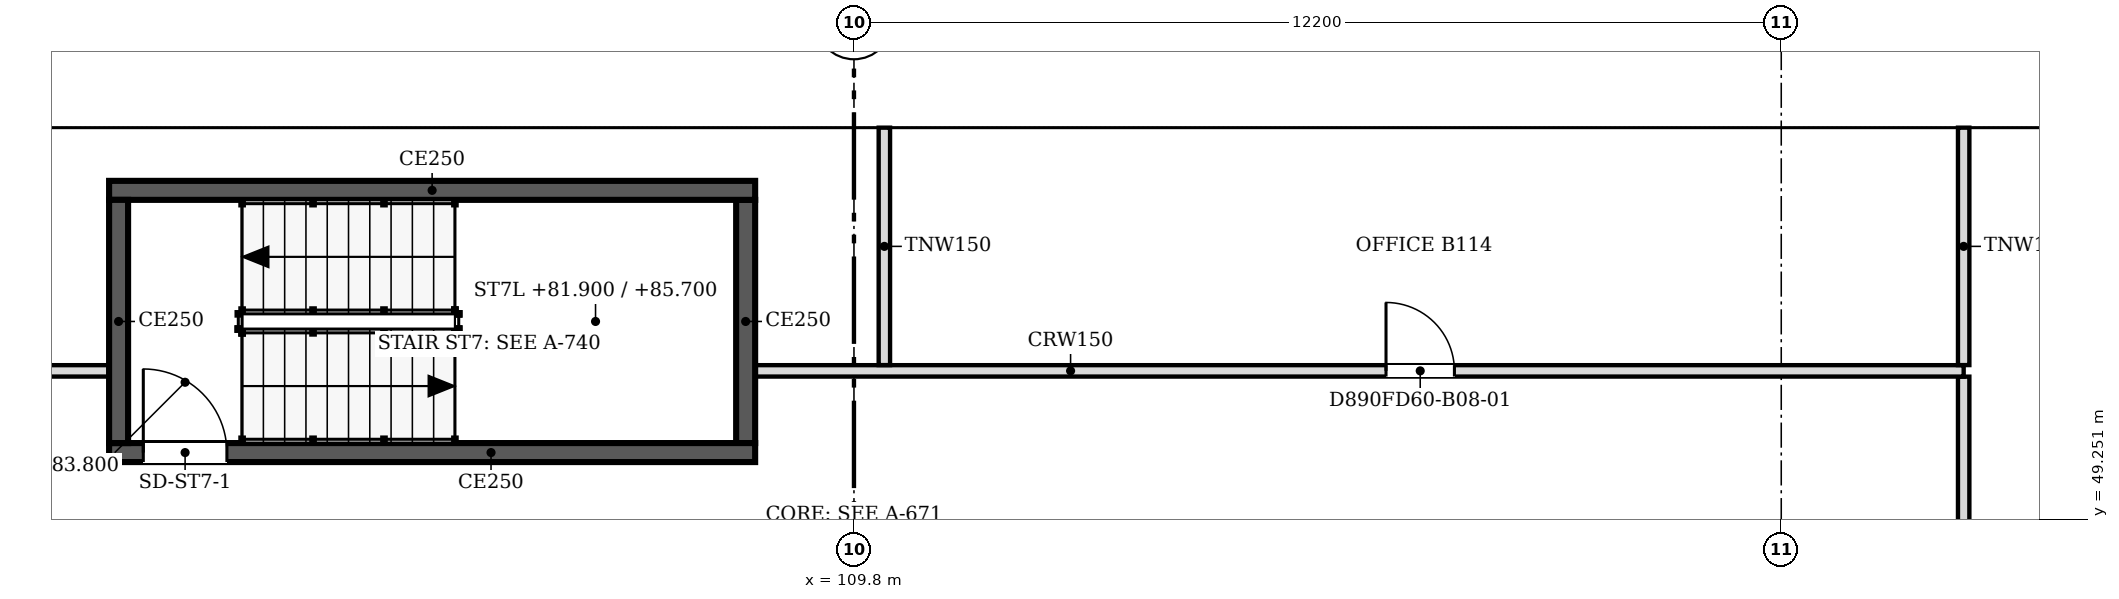
"""IFC4 building model, lengths in metres.
Left out: names, types, materials, properties, quantities, classifications, styles, units other than length and angle.
Written with IfcOpenShell. Run it as: python <this file> out.ifc"""

import sys

from ifc_helpers import new_model, si_unit, direction, frame, frame_2d, origin, place, context, subcontext, project, spatial, polyline, rectangle, outline, extrude, faceted_brep, source, transform, mapped, element, fill, save


model = new_model("IFC4")
c1 = context("Model", 3, precision=1e-05, world=origin(), true_north=direction((0.0, 1.0)))
c2 = subcontext(c1, "Body", "Model", "MODEL_VIEW")
j1 = project(units=[si_unit("LENGTHUNIT", "METRE"), si_unit("PLANEANGLEUNIT", "RADIAN")], contexts=[c1])
p1 = place(None, origin())
s1 = spatial("IfcSite", under=j1, at=p1, CompositionType="ELEMENT")
p2 = place(p1, origin())
s2 = spatial("IfcBuilding", under=s1, at=p2, CompositionType="ELEMENT")
p3 = place(p2, frame((0.0, 0.0, 80.0)))
s3 = spatial("IfcBuildingStorey", under=s2, at=p3, CompositionType="ELEMENT", Elevation=80.0)
m1 = source(origin(), c2, "Body", "Brep", [
    faceted_brep([(3.003, -0.25, 0.0), (6.053, -0.25, 3.8), (3.003, -0.25, 7.6), (0.0, -0.25, 3.8), (0.047, 0.25, 3.859), (3.003, 0.25, 7.6), (6.053, 0.25, 3.8), (3.003, 0.25, 0.0), (0.047, 0.25, 3.741), (0.0, 0.0, 3.8)], [[[0, 1, 2, 3]], [[4, 5, 6, 7, 8]], [[7, 6, 1, 0]], [[6, 5, 2, 1]], [[5, 4, 9, 3, 2]], [[8, 7, 0, 3, 9]], [[8, 9, 4]]]),
])
p4 = place(p3, frame((128.053, 54.65, -3.8), z_axis=(0.0, 0.0, 1.0), x_axis=(-1.0, 0.0, 0.0)))
e1 = element("IfcWall", 1, at=p4, inside=s3, PredefinedType="SOLIDWALL", context=c2, shape_type="MappedRepresentation", body=[
    mapped(m1, transform((0.0, 0.0, 0.0), scale=1.0)),
])
m2 = source(origin(), c2, "Body", "SweptSolid", [
    extrude(outline(polyline([(3.005, 0.401), (5.733, 3.8), (3.005, 7.199), (0.319, 3.8), (3.005, 0.401)])), frame((0.0, 0.26, 0.0), z_axis=(0.0, -1.0, 0.0), x_axis=(1.0, 0.0, 0.0)), (0.0, 0.0, 1.0), 0.52),
])
p5 = place(p4, origin())
e2 = element("IfcOpeningElement", 2, at=p5, cuts=e1, PredefinedType="OPENING", context=c2, shape_type="MappedRepresentation", body=[
    mapped(m2, transform((0.0, 0.0, 0.0), scale=1.0)),
])
m3 = source(origin(), c2, "Body", "SweptSolid", [
    extrude(outline(polyline([(3.05, 0.0), (6.1, 3.8), (3.05, 7.6), (0.0, 3.8), (3.05, 0.0)])), frame((0.0, 0.25, 0.0), z_axis=(0.0, -1.0, 0.0), x_axis=(1.0, 0.0, 0.0)), (0.0, 0.0, 1.0), 0.5),
])
p6 = place(p3, frame((122.0, 54.65, -3.8), z_axis=(0.0, 0.0, 1.0), x_axis=(-1.0, 0.0, 0.0)))
e3 = element("IfcWall", 3, at=p6, inside=s3, PredefinedType="SOLIDWALL", context=c2, shape_type="MappedRepresentation", body=[
    mapped(m3, transform((0.0, 0.0, 0.0), scale=1.0)),
])
m4 = source(origin(), c2, "Body", "SweptSolid", [
    extrude(outline(polyline([(3.05, 0.399), (5.78, 3.8), (3.05, 7.201), (0.321, 3.8), (3.05, 0.399)])), frame((0.0, 0.26, 0.0), z_axis=(0.0, -1.0, 0.0), x_axis=(1.0, 0.0, 0.0)), (0.0, 0.0, 1.0), 0.52),
])
p7 = place(p6, origin())
e4 = element("IfcOpeningElement", 4, at=p7, cuts=e3, PredefinedType="OPENING", context=c2, shape_type="MappedRepresentation", body=[
    mapped(m4, transform((0.0, 0.0, 0.0), scale=1.0)),
])
m5 = source(origin(), c2, "Body", "Brep", [
    faceted_brep([(3.05, -0.25, 0.0), (6.1, -0.25, 3.8), (6.1, -0.25, 3.8), (3.05, -0.25, 7.6), (0.0, -0.25, 3.8), (0.0, 0.25, 3.8), (3.05, 0.25, 7.6), (6.1, 0.25, 3.8), (6.1, 0.25, 3.8), (3.05, 0.25, 0.0)], [[[0, 1, 2, 3, 4]], [[5, 6, 7, 8, 9]], [[9, 8, 1, 0]], [[7, 6, 3, 2]], [[6, 5, 4, 3]], [[5, 9, 0, 4]], [[1, 8, 7, 2]]]),
])
p8 = place(p3, frame((115.9, 54.65, -3.8), z_axis=(0.0, 0.0, 1.0), x_axis=(-1.0, 0.0, 0.0)))
e5 = element("IfcWall", 5, at=p8, inside=s3, PredefinedType="SOLIDWALL", context=c2, shape_type="MappedRepresentation", body=[
    mapped(m5, transform((0.0, 0.0, 0.0), scale=1.0)),
])
p9 = place(p8, origin())
e6 = element("IfcOpeningElement", 6, at=p9, cuts=e5, PredefinedType="OPENING", context=c2, shape_type="MappedRepresentation", body=[
    mapped(m4, transform((0.0, 0.0, 0.0), scale=1.0)),
])
p10 = place(p3, frame((109.8, 54.65, -3.8), z_axis=(0.0, 0.0, 1.0), x_axis=(-1.0, 0.0, 0.0)))
e7 = element("IfcWall", 7, at=p10, inside=s3, PredefinedType="SOLIDWALL", context=c2, shape_type="MappedRepresentation", body=[
    mapped(m3, transform((0.0, 0.0, 0.0), scale=1.0)),
])
p11 = place(p10, origin())
e8 = element("IfcOpeningElement", 8, at=p11, cuts=e7, PredefinedType="OPENING", context=c2, shape_type="MappedRepresentation", body=[
    mapped(m4, transform((0.0, 0.0, 0.0), scale=1.0)),
])
p12 = place(p3, frame((103.7, 54.65, -3.8), z_axis=(0.0, 0.0, 1.0), x_axis=(-1.0, 0.0, 0.0)))
e9 = element("IfcWall", 9, at=p12, inside=s3, PredefinedType="SOLIDWALL", context=c2, shape_type="MappedRepresentation", body=[
    mapped(m5, transform((0.0, 0.0, 0.0), scale=1.0)),
])
p13 = place(p12, origin())
e10 = element("IfcOpeningElement", 10, at=p13, cuts=e9, PredefinedType="OPENING", context=c2, shape_type="MappedRepresentation", body=[
    mapped(m4, transform((0.0, 0.0, 0.0), scale=1.0)),
])
p14 = place(p2, frame((0.0, 0.0, 83.8)))
s4 = spatial("IfcBuildingStorey", under=s2, at=p14, CompositionType="ELEMENT", Elevation=83.8)
m6 = source(origin(), c2, "Body", "Brep", [
    faceted_brep([(0.047, -0.25, 0.0), (3.05, -0.25, 3.8), (0.047, -0.25, 7.6), (0.0, -0.25, 7.54), (0.0, -0.25, 0.06), (0.093, 0.25, 7.541), (3.05, 0.25, 3.8), (0.093, 0.25, 0.059), (0.047, 0.0, 0.0), (0.047, 0.0, 7.6)], [[[0, 1, 2, 3, 4]], [[5, 6, 7]], [[7, 6, 1, 0, 8]], [[6, 5, 9, 2, 1]], [[3, 2, 9]], [[8, 0, 4]], [[7, 8, 4, 3, 9, 5]]]),
])
p15 = place(p14, frame((128.1, 54.65, -3.8), z_axis=(0.0, 0.0, 1.0), x_axis=(-1.0, 0.0, 0.0)))
e11 = element("IfcWall", 11, at=p15, inside=s4, PredefinedType="SOLIDWALL", context=c2, shape_type="MappedRepresentation", body=[
    mapped(m6, transform((0.0, 0.0, 0.0), scale=1.0)),
])
m7 = source(origin(), c2, "Body", "SweptSolid", [
    extrude(outline(polyline([(0.247, 0.656), (2.731, 3.8), (0.247, 6.944), (0.247, 0.656)])), frame((0.0, 0.26, 0.0), z_axis=(0.0, -1.0, 0.0), x_axis=(1.0, 0.0, 0.0)), (0.0, 0.0, 1.0), 0.52),
])
p16 = place(p15, origin())
e12 = element("IfcOpeningElement", 12, at=p16, cuts=e11, PredefinedType="OPENING", context=c2, shape_type="MappedRepresentation", body=[
    mapped(m7, transform((0.0, 0.0, 0.0), scale=1.0)),
])
p17 = place(p14, frame((125.05, 54.65, -3.8), z_axis=(0.0, 0.0, 1.0), x_axis=(-1.0, 0.0, 0.0)))
e13 = element("IfcWall", 13, at=p17, inside=s4, PredefinedType="SOLIDWALL", context=c2, shape_type="MappedRepresentation", body=[
    mapped(m3, transform((0.0, 0.0, 0.0), scale=1.0)),
])
p18 = place(p17, origin())
e14 = element("IfcOpeningElement", 14, at=p18, cuts=e13, PredefinedType="OPENING", context=c2, shape_type="MappedRepresentation", body=[
    mapped(m4, transform((0.0, 0.0, 0.0), scale=1.0)),
])
p19 = place(p14, frame((118.95, 54.65, -3.8), z_axis=(0.0, 0.0, 1.0), x_axis=(-1.0, 0.0, 0.0)))
e15 = element("IfcWall", 15, at=p19, inside=s4, PredefinedType="SOLIDWALL", context=c2, shape_type="MappedRepresentation", body=[
    mapped(m5, transform((0.0, 0.0, 0.0), scale=1.0)),
])
p20 = place(p19, origin())
e16 = element("IfcOpeningElement", 16, at=p20, cuts=e15, PredefinedType="OPENING", context=c2, shape_type="MappedRepresentation", body=[
    mapped(m4, transform((0.0, 0.0, 0.0), scale=1.0)),
])
p21 = place(p14, frame((112.85, 54.65, -3.8), z_axis=(0.0, 0.0, 1.0), x_axis=(-1.0, 0.0, 0.0)))
e17 = element("IfcWall", 17, at=p21, inside=s4, PredefinedType="SOLIDWALL", context=c2, shape_type="MappedRepresentation", body=[
    mapped(m3, transform((0.0, 0.0, 0.0), scale=1.0)),
])
p22 = place(p21, origin())
e18 = element("IfcOpeningElement", 18, at=p22, cuts=e17, PredefinedType="OPENING", context=c2, shape_type="MappedRepresentation", body=[
    mapped(m4, transform((0.0, 0.0, 0.0), scale=1.0)),
])
p23 = place(p14, frame((106.75, 54.65, -3.8), z_axis=(0.0, 0.0, 1.0), x_axis=(-1.0, 0.0, 0.0)))
e19 = element("IfcWall", 19, at=p23, inside=s4, PredefinedType="SOLIDWALL", context=c2, shape_type="MappedRepresentation", body=[
    mapped(m3, transform((0.0, 0.0, 0.0), scale=1.0)),
])
p24 = place(p23, origin())
e20 = element("IfcOpeningElement", 20, at=p24, cuts=e19, PredefinedType="OPENING", context=c2, shape_type="MappedRepresentation", body=[
    mapped(m4, transform((0.0, 0.0, 0.0), scale=1.0)),
])
p25 = place(p14, frame((100.65, 54.65, -3.8), z_axis=(0.0, 0.0, 1.0), x_axis=(-1.0, 0.0, 0.0)))
e21 = element("IfcWall", 21, at=p25, inside=s4, PredefinedType="SOLIDWALL", context=c2, shape_type="MappedRepresentation", body=[
    mapped(m5, transform((0.0, 0.0, 0.0), scale=1.0)),
])
p26 = place(p25, origin())
e22 = element("IfcOpeningElement", 22, at=p26, cuts=e21, PredefinedType="OPENING", context=c2, shape_type="MappedRepresentation", body=[
    mapped(m4, transform((0.0, 0.0, 0.0), scale=1.0)),
])
p27 = place(p3, frame((108.5, 50.125, 0.0), z_axis=(0.0, 0.0, 1.0), x_axis=(-1.0, 0.0, 0.0)))
e23 = element("IfcWall", 23, at=p27, inside=s3, PredefinedType="SOLIDWALL", context=c2, shape_type="SweptSolid", body=[
    extrude(rectangle(XDim=8.5, YDim=0.25, at=frame_2d((4.25, 0.0))), origin(), (0.0, 0.0, 1.0), 3.8),
])
m8 = source(origin(), c2, "Body", "SweptSolid", [
    extrude(rectangle(XDim=1.1, YDim=2.1, at=frame_2d((0.55, 1.05))), frame((0.0, 0.135, 0.0), z_axis=(0.0, -1.0, 0.0), x_axis=(1.0, 0.0, 0.0)), (0.0, 0.0, 1.0), 0.27),
])
p28 = place(p27, frame((6.95, 0.0, 0.0)))
e24 = element("IfcOpeningElement", 24, at=p28, cuts=e23, PredefinedType="OPENING", context=c2, shape_type="MappedRepresentation", body=[
    mapped(m8, transform((0.0, 0.0, 0.0), scale=1.0)),
])
p29 = place(p3, frame((100.125, 50.25, 0.0), z_axis=(0.0, 0.0, 1.0), x_axis=(0.0, 1.0, 0.0)))
e25 = element("IfcWall", 25, at=p29, inside=s3, PredefinedType="SOLIDWALL", context=c2, shape_type="SweptSolid", body=[
    extrude(rectangle(XDim=3.2, YDim=0.25, at=frame_2d((1.6, 0.0))), origin(), (0.0, 0.0, 1.0), 3.8),
])
p30 = place(p3, frame((100.0, 53.575, 0.0), z_axis=(0.0, 0.0, 1.0), x_axis=(1.0, 0.0, 0.0)))
e26 = element("IfcWall", 26, at=p30, inside=s3, PredefinedType="SOLIDWALL", context=c2, shape_type="SweptSolid", body=[
    extrude(rectangle(XDim=8.5, YDim=0.25, at=frame_2d((4.25, 0.0))), origin(), (0.0, 0.0, 1.0), 3.8),
])
p31 = place(p3, frame((108.375, 53.45, 0.0), z_axis=(0.0, 0.0, 1.0), x_axis=(0.0, -1.0, 0.0)))
e27 = element("IfcWall", 27, at=p31, inside=s3, PredefinedType="SOLIDWALL", context=c2, shape_type="SweptSolid", body=[
    extrude(rectangle(XDim=3.2, YDim=0.25, at=frame_2d((1.6, 0.0))), origin(), (0.0, 0.0, 1.0), 3.8),
])
p32 = place(p3, frame((124.4, 51.124, 0.0), z_axis=(0.0, 0.0, 1.0), x_axis=(0.0, -1.0, 0.0)))
e28 = element("IfcWall", 28, at=p32, inside=s3, PredefinedType="PARTITIONING", context=c2, shape_type="SweptSolid", body=[
    extrude(rectangle(XDim=14.448, YDim=0.15, at=frame_2d((7.224, 0.0))), origin(), (0.0, 0.0, 1.0), 3.067),
])
m9 = source(origin(), c2, "Body", "SweptSolid", [
    extrude(rectangle(XDim=1.0, YDim=2.1, at=frame_2d((0.5, 1.05))), frame((0.0, 0.085, 0.0), z_axis=(0.0, -1.0, 0.0), x_axis=(1.0, 0.0, 0.0)), (0.0, 0.0, 1.0), 0.17),
])
p33 = place(p32, frame((3.724, 0.0, 0.0)))
e29 = element("IfcOpeningElement", 29, at=p33, cuts=e28, PredefinedType="OPENING", context=c2, shape_type="MappedRepresentation", body=[
    mapped(m9, transform((0.0, 0.0, 0.0), scale=1.0)),
])
p34 = place(p3, frame((95.276, 51.2, 0.0), z_axis=(0.0, 0.0, 1.0), x_axis=(1.0, 0.0, 0.0)))
e30 = element("IfcWall", 30, at=p34, inside=s3, PredefinedType="PARTITIONING", context=c2, shape_type="SweptSolid", body=[
    extrude(rectangle(XDim=4.724, YDim=0.15, at=frame_2d((2.362, 0.0))), origin(), (0.0, 0.0, 1.0), 3.067),
])
p35 = place(p34, frame((1.9, 0.0, 0.0)))
e31 = element("IfcOpeningElement", 31, at=p35, cuts=e30, PredefinedType="OPENING", context=c2, shape_type="MappedRepresentation", body=[
    mapped(m9, transform((0.0, 0.0, 0.0), scale=1.0)),
])
p36 = place(p3, frame((108.5, 51.2, 0.0), z_axis=(0.0, 0.0, 1.0), x_axis=(1.0, 0.0, 0.0)))
e32 = element("IfcWall", 32, at=p36, inside=s3, PredefinedType="PARTITIONING", context=c2, shape_type="SweptSolid", body=[
    extrude(rectangle(XDim=15.9, YDim=0.15, at=frame_2d((7.95, 0.0))), origin(), (0.0, 0.0, 1.0), 3.067),
])
m10 = source(origin(), c2, "Body", "SweptSolid", [
    extrude(rectangle(XDim=0.9, YDim=2.1, at=frame_2d((0.45, 1.05))), frame((0.0, 0.085, 0.0), z_axis=(0.0, -1.0, 0.0), x_axis=(1.0, 0.0, 0.0)), (0.0, 0.0, 1.0), 0.17),
])
p37 = place(p36, frame((8.3, 0.0, 0.0)))
e33 = element("IfcOpeningElement", 33, at=p37, cuts=e32, PredefinedType="OPENING", context=c2, shape_type="MappedRepresentation", body=[
    mapped(m10, transform((0.0, 0.0, 0.0), scale=1.0)),
])
for number, where, z_axis, x_axis in (
    (34, (110.2, 51.276, 0.0), (0.0, 0.0, 1.0), (0.0, 1.0, 0.0)),
    (35, (124.4, 51.276, 0.0), (0.0, 0.0, 1.0), (0.0, 1.0, 0.0)),
):
    element("IfcWall", number, at=place(p3, frame(where, z_axis=z_axis, x_axis=x_axis)), inside=s3, PredefinedType="PARTITIONING", context=c2, shape_type="SweptSolid", body=[
        extrude(rectangle(XDim=3.124, YDim=0.15, at=frame_2d((1.562, 0.0))), origin(), (0.0, 0.0, 1.0), 3.067),
    ])
m11 = source(origin(), c2, "Body", "SweptSolid", [
    extrude(rectangle(XDim=1.1, YDim=2.1, at=frame_2d((0.55, 1.05))), frame((0.0, 0.025, 0.0), z_axis=(0.0, -1.0, 0.0), x_axis=(1.0, 0.0, 0.0)), (0.0, 0.0, 1.0), 0.05),
])
p38 = place(p28, origin())
e36 = element("IfcDoor", 36, at=p38, inside=s3, OperationType="SINGLE_SWING_RIGHT", PredefinedType="DOOR", context=c2, shape_type="MappedRepresentation", body=[
    mapped(m11, transform((0.0, 0.0, 0.0), scale=1.0)),
])
fill(e24, e36)
m12 = source(origin(), c2, "Body", "SweptSolid", [
    extrude(rectangle(XDim=0.9, YDim=2.1, at=frame_2d((0.45, 1.05))), frame((0.0, 0.025, 0.0), z_axis=(0.0, -1.0, 0.0), x_axis=(1.0, 0.0, 0.0)), (0.0, 0.0, 1.0), 0.05),
])
p39 = place(p37, origin())
e37 = element("IfcDoor", 37, at=p39, inside=s3, OperationType="SINGLE_SWING_LEFT", PredefinedType="DOOR", context=c2, shape_type="MappedRepresentation", body=[
    mapped(m12, transform((0.0, 0.0, 0.0), scale=1.0)),
])
fill(e33, e37)
save(model, sys.argv[1])
